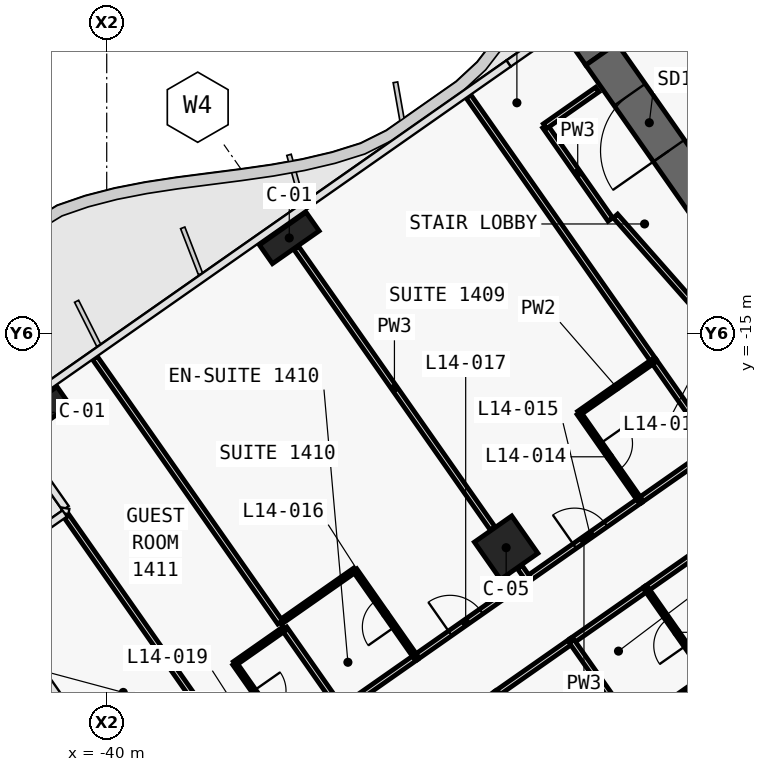
"""IFC4 building model, lengths in metres.
Left out: names, types, materials, properties, quantities, classifications, styles, units other than length and angle.
Written with IfcOpenShell. Run it as: python <this file> out.ifc"""

import sys

from ifc_helpers import new_model, si_unit, direction, frame, frame_2d, origin, origin_2d, place, context, subcontext, project, spatial, polyline, rectangle, outline, extrude, element, fill, save


model = new_model("IFC4")
c1 = context("Model", 3, precision=1e-05, world=origin(), true_north=direction((0.0, 1.0)))
c2 = subcontext(c1, "Body", "Model", "MODEL_VIEW")
j1 = project(units=[si_unit("LENGTHUNIT", "METRE"), si_unit("PLANEANGLEUNIT", "RADIAN")], contexts=[c1])
p1 = place(None, origin())
s1 = spatial("IfcSite", under=j1, at=p1, CompositionType="ELEMENT")
p2 = place(p1, origin())
s2 = spatial("IfcBuilding", under=s1, at=p2, CompositionType="ELEMENT")
p3 = place(p2, frame((0.0, 0.0, 76.1)))
s3 = spatial("IfcBuildingStorey", under=s2, at=p3, CompositionType="ELEMENT", Elevation=76.1)
p4 = place(p3, frame((0.037, 11.867, 0.0), z_axis=(0.0, 0.0, 1.0), x_axis=(-0.819155306259, -0.573571777746, 0.0)))
e1 = element("IfcWall", 1, at=p4, inside=s3, PredefinedType="SHEAR", context=c2, shape_type="SweptSolid", body=[
    extrude(outline(polyline([(33.837, 0.5), (0.7, 0.5), (0.0, -0.5), (33.837, -0.5), (33.837, 0.5)])), origin(), (0.0, 0.0, 1.0), 3.6),
])
p5 = place(p3, frame((-21.708, -15.2, 0.0), z_axis=(0.0, 0.0, 1.0), x_axis=(-0.573576324356, 0.819152122709, 0.0)))
e2 = element("IfcWall", 2, at=p5, inside=s3, PredefinedType="SHEAR", context=c2, shape_type="SweptSolid", body=[
    extrude(outline(polyline([(0.0, 0.5), (0.0, -0.5), (9.2, -0.5), (9.2, 0.5), (0.0, 0.5)])), origin(), (0.0, 0.0, 1.0), 3.6),
])
p6 = place(p5, frame((6.1, 0.0, 0.0)))
e3 = element("IfcOpeningElement", 3, at=p6, cuts=e2, PredefinedType="OPENING", context=c2, shape_type="SweptSolid", body=[
    extrude(rectangle(XDim=1.8, YDim=2.1, at=frame_2d((0.9, 1.05))), frame((0.0, 0.51, 0.0), z_axis=(0.0, -1.0, 0.0), x_axis=(1.0, 0.0, 0.0)), (0.0, 0.0, 1.0), 1.02),
])
p7 = place(p5, frame((1.9, 0.0, 0.0)))
e4 = element("IfcOpeningElement", 4, at=p7, cuts=e2, PredefinedType="OPENING", context=c2, shape_type="SweptSolid", body=[
    extrude(rectangle(XDim=1.8, YDim=2.1, at=frame_2d((0.9, 1.05))), frame((0.0, 0.51, 0.0), z_axis=(0.0, -1.0, 0.0), x_axis=(1.0, 0.0, 0.0)), (0.0, 0.0, 1.0), 1.02),
])
for number, where, z_axis, x_axis in (
    (5, (-35.197, -12.498, 0.0), (0.0, 0.0, 1.0), (-0.819, -0.574, 0.0)),
    (6, (-41.75, -17.087, 0.0), (0.0, 0.0, 1.0), (-0.819, -0.574, 0.0)),
):
    element("IfcColumn", number, at=place(p3, frame(where, z_axis=z_axis, x_axis=x_axis)), inside=s3, PredefinedType="COLUMN", context=c2, shape_type="SweptSolid", body=[
        extrude(rectangle(XDim=1.5, YDim=0.6, at=origin_2d()), origin(), (0.0, 0.0, 1.0), 3.6),
    ])
p8 = place(p3, frame((-29.49, -20.649, 0.0), z_axis=(0.0, 0.0, 1.0), x_axis=(-0.819152044289, -0.573576436351, 0.0)))
e7 = element("IfcColumn", 7, at=p8, inside=s3, PredefinedType="COLUMN", context=c2, shape_type="SweptSolid", body=[
    extrude(rectangle(XDim=1.2, YDim=1.2, at=origin_2d()), origin(), (0.0, 0.0, 1.0), 3.6),
])
p9 = place(p3, frame((-28.917, -21.469, 0.0), z_axis=(0.0, 0.0, 1.0), x_axis=(0.81917779803, 0.57353965444, 0.0)))
e8 = element("IfcWall", 8, at=p9, inside=s3, PredefinedType="PARTITIONING", context=c2, shape_type="SweptSolid", body=[
    extrude(rectangle(XDim=3.603, YDim=0.15, at=frame_2d((1.801, 0.0))), origin(), (0.0, 0.0, 1.0), 2.6),
])
p10 = place(p9, frame((1.502, 0.0, 0.0)))
e9 = element("IfcOpeningElement", 9, at=p10, cuts=e8, PredefinedType="OPENING", context=c2, shape_type="SweptSolid", body=[
    extrude(rectangle(XDim=1.0, YDim=2.1, at=frame_2d((0.5, 1.05))), frame((0.0, 0.085, 0.0), z_axis=(0.0, -1.0, 0.0), x_axis=(1.0, 0.0, 0.0)), (0.0, 0.0, 1.0), 0.17),
])
p11 = place(p3, frame((-25.969, -19.404, 0.0), z_axis=(0.0, 0.0, 1.0), x_axis=(0.819146032251, 0.573585022335, 0.0)))
e10 = element("IfcWall", 10, at=p11, inside=s3, PredefinedType="PARTITIONING", context=c2, shape_type="SweptSolid", body=[
    extrude(rectangle(XDim=2.404, YDim=0.15, at=frame_2d((1.202, 0.0))), origin(), (0.0, 0.0, 1.0), 3.32),
])
p12 = place(p3, frame((-31.866, -23.533, 0.0), z_axis=(0.0, 0.0, 1.0), x_axis=(0.819145961204, 0.573585123798, 0.0)))
e11 = element("IfcWall", 11, at=p12, inside=s3, PredefinedType="PARTITIONING", context=c2, shape_type="SweptSolid", body=[
    extrude(rectangle(XDim=3.603, YDim=0.15, at=frame_2d((1.802, 0.0))), origin(), (0.0, 0.0, 1.0), 2.6),
])
p13 = place(p12, frame((1.101, 0.0, 0.0)))
e12 = element("IfcOpeningElement", 12, at=p13, cuts=e11, PredefinedType="OPENING", context=c2, shape_type="SweptSolid", body=[
    extrude(rectangle(XDim=1.0, YDim=2.1, at=frame_2d((0.5, 1.05))), frame((0.0, 0.085, 0.0), z_axis=(0.0, -1.0, 0.0), x_axis=(1.0, 0.0, 0.0)), (0.0, 0.0, 1.0), 0.17),
])
p14 = place(p3, frame((-33.833, -24.91, 0.0), z_axis=(0.0, 0.0, 1.0), x_axis=(0.819146032251, 0.573585022335, 0.0)))
e13 = element("IfcWall", 13, at=p14, inside=s3, PredefinedType="PARTITIONING", context=c2, shape_type="SweptSolid", body=[
    extrude(rectangle(XDim=2.404, YDim=0.15, at=frame_2d((1.202, 0.0))), origin(), (0.0, 0.0, 1.0), 3.32),
])
p15 = place(p3, frame((-20.395, -17.943, 0.0), z_axis=(0.0, 0.0, 1.0), x_axis=(-0.819153746897, -0.573574004767, 0.0)))
e14 = element("IfcWall", 14, at=p15, inside=s3, PredefinedType="PARTITIONING", context=c2, shape_type="SweptSolid", body=[
    extrude(rectangle(XDim=6.603, YDim=0.15, at=frame_2d((3.302, 0.0))), origin(), (0.0, 0.0, 1.0), 2.6),
])
p16 = place(p15, frame((2.802, 0.0, 0.0)))
e15 = element("IfcOpeningElement", 15, at=p16, cuts=e14, PredefinedType="OPENING", context=c2, shape_type="SweptSolid", body=[
    extrude(rectangle(XDim=1.0, YDim=2.1, at=frame_2d((0.5, 1.05))), frame((0.0, 0.085, 0.0), z_axis=(0.0, -1.0, 0.0), x_axis=(1.0, 0.0, 0.0)), (0.0, 0.0, 1.0), 0.17),
])
p17 = place(p3, frame((-25.801, -21.729, 0.0), z_axis=(0.0, 0.0, 1.0), x_axis=(-0.819179439794, -0.573537309527, 0.0)))
e16 = element("IfcWall", 16, at=p17, inside=s3, PredefinedType="PARTITIONING", context=c2, shape_type="SweptSolid", body=[
    extrude(rectangle(XDim=2.404, YDim=0.15, at=frame_2d((1.202, 0.0))), origin(), (0.0, 0.0, 1.0), 2.6),
])
p18 = place(p3, frame((-29.734, -24.482, 0.0), z_axis=(0.0, 0.0, 1.0), x_axis=(-0.819153746897, -0.573574004767, 0.0)))
e17 = element("IfcWall", 17, at=p18, inside=s3, PredefinedType="PARTITIONING", context=c2, shape_type="SweptSolid", body=[
    extrude(rectangle(XDim=6.603, YDim=0.15, at=frame_2d((3.302, 0.0))), origin(), (0.0, 0.0, 1.0), 3.32),
])
p19 = place(p18, frame((2.801, 0.0, 0.0)))
e18 = element("IfcOpeningElement", 18, at=p19, cuts=e17, PredefinedType="OPENING", context=c2, shape_type="SweptSolid", body=[
    extrude(rectangle(XDim=1.0, YDim=2.1, at=frame_2d((0.5, 1.05))), frame((0.0, 0.085, 0.0), z_axis=(0.0, -1.0, 0.0), x_axis=(1.0, 0.0, 0.0)), (0.0, 0.0, 1.0), 0.17),
])
p20 = place(p3, frame((-27.767, -23.105, 0.0), z_axis=(0.0, 0.0, 1.0), x_axis=(-0.819146032251, -0.573585022335, 0.0)))
e19 = element("IfcWall", 19, at=p20, inside=s3, PredefinedType="PARTITIONING", context=c2, shape_type="SweptSolid", body=[
    extrude(rectangle(XDim=2.404, YDim=0.15, at=frame_2d((1.202, 0.0))), origin(), (0.0, 0.0, 1.0), 2.6),
])
p21 = place(p3, frame((-26.746, -12.014, 0.0), z_axis=(0.0, 0.0, 1.0), x_axis=(-0.573560650686, 0.819163097304, 0.0)))
e20 = element("IfcWall", 20, at=p21, inside=s3, PredefinedType="PARTITIONING", context=c2, shape_type="SweptSolid", body=[
    extrude(rectangle(XDim=3.0, YDim=0.15, at=frame_2d((1.5, 0.0))), origin(), (0.0, 0.0, 1.0), 3.32),
])
p22 = place(p3, frame((-28.467, -9.556, 0.0), z_axis=(0.0, 0.0, 1.0), x_axis=(0.819109000826, 0.573637903879, 0.0)))
e21 = element("IfcWall", 21, at=p22, inside=s3, PredefinedType="PARTITIONING", context=c2, shape_type="SweptSolid", body=[
    extrude(rectangle(XDim=1.68, YDim=0.15, at=frame_2d((0.84, 0.0))), origin(), (0.0, 0.0, 1.0), 3.32),
])
p23 = place(p3, frame((-22.284, -16.827, 0.0), z_axis=(0.0, 0.0, 1.0), x_axis=(-0.661545117561, 0.749905365651, 0.0)))
e22 = element("IfcWall", 22, at=p23, inside=s3, PredefinedType="PARTITIONING", context=c2, shape_type="SweptSolid", body=[
    extrude(rectangle(XDim=6.543, YDim=0.15, at=frame_2d((3.271, 0.0))), origin(), (0.0, 0.0, 1.0), 2.6),
])
p24 = place(p3, frame((-25.606, -15.734, 0.0), z_axis=(0.0, 0.0, 1.0), x_axis=(-0.573576058406, 0.819152308929, 0.0)))
e23 = element("IfcWall", 23, at=p24, inside=s3, PredefinedType="PARTITIONING", context=c2, shape_type="SweptSolid", body=[
    extrude(rectangle(XDim=8.501, YDim=0.15, at=frame_2d((4.25, 0.0))), origin(), (0.0, 0.0, 1.0), 2.6),
])
p25 = place(p3, frame((-24.001, -18.026, 0.0), z_axis=(0.0, 0.0, 1.0), x_axis=(-0.573596837309, 0.819137759006, 0.0)))
e24 = element("IfcWall", 24, at=p25, inside=s3, PredefinedType="PARTITIONING", context=c2, shape_type="SweptSolid", body=[
    extrude(rectangle(XDim=2.802, YDim=0.15, at=frame_2d((1.401, 0.0))), origin(), (0.0, 0.0, 1.0), 2.6),
])
p26 = place(p3, frame((-25.608, -15.732, 0.0), z_axis=(0.0, 0.0, 1.0), x_axis=(-0.819107643868, -0.573639841501, 0.0)))
e25 = element("IfcWall", 25, at=p26, inside=s3, PredefinedType="PARTITIONING", context=c2, shape_type="SweptSolid", body=[
    extrude(rectangle(XDim=2.4, YDim=0.12, at=frame_2d((1.2, 0.0))), origin(), (0.0, 0.0, 1.0), 3.32),
])
p27 = place(p3, frame((-27.574, -17.11, 0.0), z_axis=(0.0, 0.0, 1.0), x_axis=(0.573591086599, -0.819141785879, 0.0)))
e26 = element("IfcWall", 26, at=p27, inside=s3, PredefinedType="PARTITIONING", context=c2, shape_type="SweptSolid", body=[
    extrude(rectangle(XDim=2.8, YDim=0.12, at=frame_2d((1.4, 0.0))), origin(), (0.0, 0.0, 1.0), 2.6),
])
p28 = place(p27, frame((0.975, 0.0, 0.0)))
e27 = element("IfcOpeningElement", 27, at=p28, cuts=e26, PredefinedType="OPENING", context=c2, shape_type="SweptSolid", body=[
    extrude(rectangle(XDim=0.85, YDim=2.05, at=frame_2d((0.425, 1.025))), frame((0.0, 0.07, 0.0), z_axis=(0.0, -1.0, 0.0), x_axis=(1.0, 0.0, 0.0)), (0.0, 0.0, 1.0), 0.14),
])
p29 = place(p3, frame((-28.916, -21.468, 0.0), z_axis=(0.0, 0.0, 1.0), x_axis=(-0.572944929411, 0.819593867633, 0.0)))
e28 = element("IfcWall", 28, at=p29, inside=s3, PredefinedType="PARTITIONING", context=c2, shape_type="SweptSolid", body=[
    extrude(rectangle(XDim=0.38, YDim=0.15, at=frame_2d((0.19, 0.0))), origin(), (0.0, 0.0, 1.0), 2.6),
])
p30 = place(p3, frame((-29.845, -20.141, 0.0), z_axis=(0.0, 0.0, 1.0), x_axis=(-0.573558725113, 0.819164445546, 0.0)))
e29 = element("IfcWall", 29, at=p30, inside=s3, PredefinedType="PARTITIONING", context=c2, shape_type="SweptSolid", body=[
    extrude(rectangle(XDim=9.01, YDim=0.15, at=frame_2d((4.505, 0.0))), origin(), (0.0, 0.0, 1.0), 2.6),
])
p31 = place(p3, frame((-31.864, -23.532, 0.0), z_axis=(0.0, 0.0, 1.0), x_axis=(-0.573550118428, 0.819170471667, 0.0)))
e30 = element("IfcWall", 30, at=p31, inside=s3, PredefinedType="PARTITIONING", context=c2, shape_type="SweptSolid", body=[
    extrude(rectangle(XDim=2.8, YDim=0.12, at=frame_2d((1.4, 0.0))), origin(), (0.0, 0.0, 1.0), 2.6),
])
p32 = place(p31, frame((0.975, 0.0, 0.0)))
e31 = element("IfcOpeningElement", 31, at=p32, cuts=e30, PredefinedType="OPENING", context=c2, shape_type="SweptSolid", body=[
    extrude(rectangle(XDim=0.85, YDim=2.05, at=frame_2d((0.425, 1.025))), frame((0.0, 0.07, 0.0), z_axis=(0.0, -1.0, 0.0), x_axis=(1.0, 0.0, 0.0)), (0.0, 0.0, 1.0), 0.14),
])
p33 = place(p3, frame((-33.471, -21.238, 0.0), z_axis=(0.0, 0.0, 1.0), x_axis=(-0.819141114317, -0.573592045652, 0.0)))
e32 = element("IfcWall", 32, at=p33, inside=s3, PredefinedType="PARTITIONING", context=c2, shape_type="SweptSolid", body=[
    extrude(rectangle(XDim=2.4, YDim=0.12, at=frame_2d((1.2, 0.0))), origin(), (0.0, 0.0, 1.0), 3.32),
])
p34 = place(p3, frame((-35.438, -22.615, 0.0), z_axis=(0.0, 0.0, 1.0), x_axis=(-0.573560662175, 0.81916308926, 0.0)))
e33 = element("IfcWall", 33, at=p34, inside=s3, PredefinedType="PARTITIONING", context=c2, shape_type="SweptSolid", body=[
    extrude(rectangle(XDim=8.499, YDim=0.15, at=frame_2d((4.25, 0.0))), origin(), (0.0, 0.0, 1.0), 2.5),
])
p35 = place(p3, frame((-33.831, -24.909, 0.0), z_axis=(0.0, 0.0, 1.0), x_axis=(-0.573544201094, 0.819174614714, 0.0)))
e34 = element("IfcWall", 34, at=p35, inside=s3, PredefinedType="PARTITIONING", context=c2, shape_type="SweptSolid", body=[
    extrude(rectangle(XDim=2.602, YDim=0.15, at=frame_2d((1.301, 0.0))), origin(), (0.0, 0.0, 1.0), 2.6),
])
p36 = place(p3, frame((-35.323, -22.779, 0.0), z_axis=(0.0, 0.0, 1.0), x_axis=(-0.819131543282, -0.57360571371, 0.0)))
e35 = element("IfcWall", 35, at=p36, inside=s3, PredefinedType="PARTITIONING", context=c2, shape_type="SweptSolid", body=[
    extrude(rectangle(XDim=1.6, YDim=0.12, at=frame_2d((0.8, 0.0))), origin(), (0.0, 0.0, 1.0), 3.32),
])
p37 = place(p3, frame((-36.634, -23.698, 0.0), z_axis=(0.0, 0.0, 1.0), x_axis=(0.573582085028, -0.819148089014, 0.0)))
e36 = element("IfcWall", 36, at=p37, inside=s3, PredefinedType="PARTITIONING", context=c2, shape_type="SweptSolid", body=[
    extrude(rectangle(XDim=2.6, YDim=0.12, at=frame_2d((1.3, 0.0))), origin(), (0.0, 0.0, 1.0), 2.6),
])
p38 = place(p37, frame((0.875, 0.0, 0.0)))
e37 = element("IfcOpeningElement", 37, at=p38, cuts=e36, PredefinedType="OPENING", context=c2, shape_type="SweptSolid", body=[
    extrude(rectangle(XDim=0.85, YDim=2.05, at=frame_2d((0.425, 1.025))), frame((0.0, 0.07, 0.0), z_axis=(0.0, -1.0, 0.0), x_axis=(1.0, 0.0, 0.0)), (0.0, 0.0, 1.0), 0.14),
])
p39 = place(p3, frame((-36.288, -26.63, 0.0), z_axis=(0.0, 0.0, 1.0), x_axis=(-0.573555124968, 0.819166966267, 0.0)))
e38 = element("IfcWall", 38, at=p39, inside=s3, PredefinedType="PARTITIONING", context=c2, shape_type="SweptSolid", body=[
    extrude(rectangle(XDim=8.3, YDim=0.15, at=frame_2d((4.15, 0.0))), origin(), (0.0, 0.0, 1.0), 2.6),
])
p40 = place(p3, frame((-26.162, -25.401, 0.0), z_axis=(0.0, 0.0, 1.0), x_axis=(0.819155442668, 0.573571582932, 0.0)))
e39 = element("IfcWall", 39, at=p40, inside=s3, PredefinedType="PARTITIONING", context=c2, shape_type="SweptSolid", body=[
    extrude(rectangle(XDim=2.4, YDim=0.12, at=frame_2d((1.2, 0.0))), origin(), (0.0, 0.0, 1.0), 2.6),
])
p41 = place(p3, frame((-24.196, -24.023, 0.0), z_axis=(0.0, 0.0, 1.0), x_axis=(-0.573608623498, 0.819129505664, 0.0)))
e40 = element("IfcWall", 40, at=p41, inside=s3, PredefinedType="PARTITIONING", context=c2, shape_type="SweptSolid", body=[
    extrude(rectangle(XDim=2.8, YDim=0.12, at=frame_2d((1.4, 0.0))), origin(), (0.0, 0.0, 1.0), 3.32),
])
p42 = place(p41, frame((0.975, 0.0, 0.0)))
e41 = element("IfcOpeningElement", 41, at=p42, cuts=e40, PredefinedType="OPENING", context=c2, shape_type="SweptSolid", body=[
    extrude(rectangle(XDim=0.85, YDim=2.05, at=frame_2d((0.425, 1.025))), frame((0.0, 0.07, 0.0), z_axis=(0.0, -1.0, 0.0), x_axis=(1.0, 0.0, 0.0)), (0.0, 0.0, 1.0), 0.14),
])
p43 = place(p3, frame((-26.163, -25.4, 0.0), z_axis=(0.0, 0.0, 1.0), x_axis=(-0.573608623498, 0.819129505664, 0.0)))
e42 = element("IfcWall", 42, at=p43, inside=s3, PredefinedType="PARTITIONING", context=c2, shape_type="SweptSolid", body=[
    extrude(rectangle(XDim=2.8, YDim=0.15, at=frame_2d((1.4, 0.0))), origin(), (0.0, 0.0, 1.0), 2.6),
])
p44 = place(p6, origin())
e43 = element("IfcDoor", 43, at=p44, inside=s3, OperationType="DOUBLE_DOOR_SINGLE_SWING", PredefinedType="DOOR", context=c2, shape_type="SweptSolid", body=[
    extrude(rectangle(XDim=1.8, YDim=2.1, at=frame_2d((0.9, 1.05))), frame((0.0, 0.025, 0.0), z_axis=(0.0, -1.0, 0.0), x_axis=(1.0, 0.0, 0.0)), (0.0, 0.0, 1.0), 0.05),
])
fill(e3, e43)
p45 = place(p42, origin())
e44 = element("IfcDoor", 44, at=p45, inside=s3, OperationType="SINGLE_SWING_RIGHT", PredefinedType="DOOR", context=c2, shape_type="SweptSolid", body=[
    extrude(rectangle(XDim=0.85, YDim=2.05, at=frame_2d((0.425, 1.025))), frame((0.0, 0.025, 0.0), z_axis=(0.0, -1.0, 0.0), x_axis=(1.0, 0.0, 0.0)), (0.0, 0.0, 1.0), 0.05),
])
fill(e41, e44)
p46 = place(p28, origin())
e45 = element("IfcDoor", 45, at=p46, inside=s3, OperationType="SINGLE_SWING_RIGHT", PredefinedType="DOOR", context=c2, shape_type="SweptSolid", body=[
    extrude(rectangle(XDim=0.85, YDim=2.05, at=frame_2d((0.425, 1.025))), frame((0.0, 0.025, 0.0), z_axis=(0.0, -1.0, 0.0), x_axis=(1.0, 0.0, 0.0)), (0.0, 0.0, 1.0), 0.05),
])
fill(e27, e45)
p47 = place(p10, origin())
e46 = element("IfcDoor", 46, at=p47, inside=s3, OperationType="SINGLE_SWING_LEFT", PredefinedType="DOOR", context=c2, shape_type="SweptSolid", body=[
    extrude(rectangle(XDim=1.0, YDim=2.1, at=frame_2d((0.5, 1.05))), frame((0.0, 0.025, 0.0), z_axis=(0.0, -1.0, 0.0), x_axis=(1.0, 0.0, 0.0)), (0.0, 0.0, 1.0), 0.05),
])
fill(e9, e46)
p48 = place(p32, origin())
e47 = element("IfcDoor", 47, at=p48, inside=s3, OperationType="SINGLE_SWING_RIGHT", PredefinedType="DOOR", context=c2, shape_type="SweptSolid", body=[
    extrude(rectangle(XDim=0.85, YDim=2.05, at=frame_2d((0.425, 1.025))), frame((0.0, 0.025, 0.0), z_axis=(0.0, -1.0, 0.0), x_axis=(1.0, 0.0, 0.0)), (0.0, 0.0, 1.0), 0.05),
])
fill(e31, e47)
p49 = place(p13, origin())
e48 = element("IfcDoor", 48, at=p49, inside=s3, OperationType="SINGLE_SWING_LEFT", PredefinedType="DOOR", context=c2, shape_type="SweptSolid", body=[
    extrude(rectangle(XDim=1.0, YDim=2.1, at=frame_2d((0.5, 1.05))), frame((0.0, 0.025, 0.0), z_axis=(0.0, -1.0, 0.0), x_axis=(1.0, 0.0, 0.0)), (0.0, 0.0, 1.0), 0.05),
])
fill(e12, e48)
p50 = place(p38, origin())
e49 = element("IfcDoor", 49, at=p50, inside=s3, OperationType="SINGLE_SWING_LEFT", PredefinedType="DOOR", context=c2, shape_type="SweptSolid", body=[
    extrude(rectangle(XDim=0.85, YDim=2.05, at=frame_2d((0.425, 1.025))), frame((0.0, 0.025, 0.0), z_axis=(0.0, -1.0, 0.0), x_axis=(1.0, 0.0, 0.0)), (0.0, 0.0, 1.0), 0.05),
])
fill(e37, e49)
save(model, sys.argv[1])
